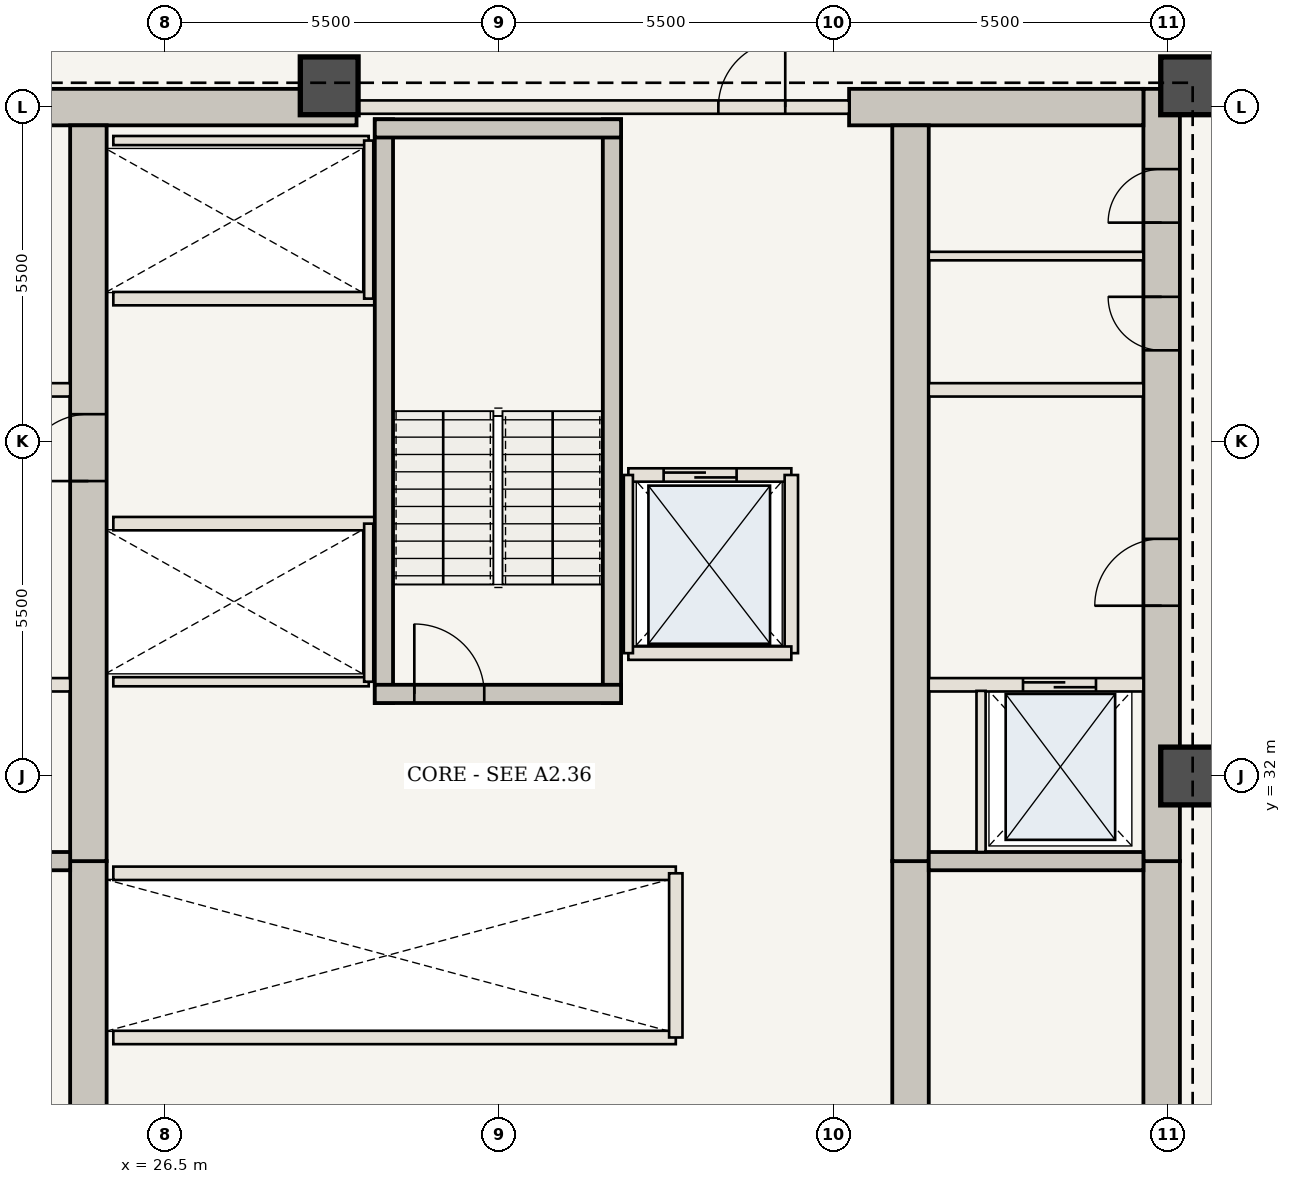
"""IFC4 building model, lengths in metres.
Left out: names, types, materials, properties, quantities, classifications, styles, units other than length and angle.
Written with IfcOpenShell. Run it as: python <this file> out.ifc"""

import sys

from ifc_helpers import new_model, si_unit, direction, frame, frame_2d, origin, origin_2d, place, context, subcontext, project, spatial, rectangle, extrude, element, fill, save


model = new_model("IFC4")
c1 = context("Model", 3, precision=1e-05, world=origin(), true_north=direction((0.0, 1.0)))
c2 = subcontext(c1, "Body", "Model", "MODEL_VIEW")
j1 = project(units=[si_unit("LENGTHUNIT", "METRE"), si_unit("PLANEANGLEUNIT", "RADIAN")], contexts=[c1])
p1 = place(None, origin())
s1 = spatial("IfcSite", under=j1, at=p1, CompositionType="ELEMENT")
p2 = place(p1, origin())
s2 = spatial("IfcBuilding", under=s1, at=p2, CompositionType="ELEMENT")
p3 = place(p2, frame((0.0, 0.0, 156.8)))
s3 = spatial("IfcBuildingStorey", under=s2, at=p3, CompositionType="ELEMENT", Elevation=156.8)
p4 = place(p3, frame((42.89, 20.65, 0.0), z_axis=(0.0, 0.0, 1.0), x_axis=(0.0, 1.0, 0.0)))
e1 = element("IfcWall", 1, at=p4, inside=s3, PredefinedType="SHEAR", context=c2, shape_type="SweptSolid", body=[
    extrude(rectangle(XDim=9.95, YDim=0.6, at=frame_2d((4.975, 0.0))), origin(), (0.0, 0.0, 1.0), 3.85),
])
p5 = place(p4, frame((1.1, 0.0, 0.0)))
e2 = element("IfcOpeningElement", 2, at=p5, cuts=e1, PredefinedType="OPENING", context=c2, shape_type="SweptSolid", body=[
    extrude(rectangle(XDim=1.15, YDim=2.15, at=frame_2d((0.575, 1.075))), frame((0.0, 0.31, 0.0), z_axis=(0.0, -1.0, 0.0), x_axis=(1.0, 0.0, 0.0)), (0.0, 0.0, 1.0), 0.62),
])
p6 = place(p3, frame((42.89, 30.6, 0.0), z_axis=(0.0, 0.0, 1.0), x_axis=(0.0, 1.0, 0.0)))
e3 = element("IfcWall", 3, at=p6, inside=s3, PredefinedType="SHEAR", context=c2, shape_type="SweptSolid", body=[
    extrude(rectangle(XDim=12.7, YDim=0.6, at=frame_2d((6.35, 0.0))), origin(), (0.0, 0.0, 1.0), 3.85),
])
p7 = place(p6, frame((4.2, 0.0, 0.0)))
e4 = element("IfcOpeningElement", 4, at=p7, cuts=e3, PredefinedType="OPENING", context=c2, shape_type="SweptSolid", body=[
    extrude(rectangle(XDim=1.1, YDim=2.15, at=frame_2d((0.55, 1.075))), frame((0.0, 0.31, 0.0), z_axis=(0.0, -1.0, 0.0), x_axis=(1.0, 0.0, 0.0)), (0.0, 0.0, 1.0), 0.62),
])
p8 = place(p6, frame((8.4, 0.0, 0.0)))
e5 = element("IfcOpeningElement", 5, at=p8, cuts=e3, PredefinedType="OPENING", context=c2, shape_type="SweptSolid", body=[
    extrude(rectangle(XDim=0.88, YDim=2.1, at=frame_2d((0.44, 1.05))), frame((0.0, 0.31, 0.0), z_axis=(0.0, -1.0, 0.0), x_axis=(1.0, 0.0, 0.0)), (0.0, 0.0, 1.0), 0.62),
])
p9 = place(p6, frame((10.5, 0.0, 0.0)))
e6 = element("IfcOpeningElement", 6, at=p9, cuts=e3, PredefinedType="OPENING", context=c2, shape_type="SweptSolid", body=[
    extrude(rectangle(XDim=0.88, YDim=2.1, at=frame_2d((0.44, 1.05))), frame((0.0, 0.31, 0.0), z_axis=(0.0, -1.0, 0.0), x_axis=(1.0, 0.0, 0.0)), (0.0, 0.0, 1.0), 0.62),
])
p10 = place(p3, frame((21.41, 43.0, 0.0), z_axis=(0.0, 0.0, 1.0), x_axis=(1.0, 0.0, 0.0)))
e7 = element("IfcWall", 7, at=p10, inside=s3, PredefinedType="SHEAR", context=c2, shape_type="SweptSolid", body=[
    extrude(rectangle(XDim=8.24, YDim=0.6, at=frame_2d((4.12, 0.0))), origin(), (0.0, 0.0, 1.0), 3.85),
])
p11 = place(p3, frame((37.75, 43.0, 0.0), z_axis=(0.0, 0.0, 1.0), x_axis=(1.0, 0.0, 0.0)))
e8 = element("IfcWall", 8, at=p11, inside=s3, PredefinedType="SHEAR", context=c2, shape_type="SweptSolid", body=[
    extrude(rectangle(XDim=4.84, YDim=0.6, at=frame_2d((2.42, 0.0))), origin(), (0.0, 0.0, 1.0), 3.85),
])
p12 = place(p3, frame((25.24, 21.25, 0.0), z_axis=(0.0, 0.0, 1.0), x_axis=(0.0, 1.0, 0.0)))
e9 = element("IfcWall", 9, at=p12, inside=s3, PredefinedType="SHEAR", context=c2, shape_type="SweptSolid", body=[
    extrude(rectangle(XDim=9.35, YDim=0.6, at=frame_2d((4.675, 0.0))), origin(), (0.0, 0.0, 1.0), 3.85),
])
p13 = place(p3, frame((25.24, 30.6, 0.0), z_axis=(0.0, 0.0, 1.0), x_axis=(0.0, 1.0, 0.0)))
e10 = element("IfcWall", 10, at=p13, inside=s3, PredefinedType="SHEAR", context=c2, shape_type="SweptSolid", body=[
    extrude(rectangle(XDim=12.1, YDim=0.6, at=frame_2d((6.05, 0.0))), origin(), (0.0, 0.0, 1.0), 3.85),
])
p14 = place(p13, frame((6.25, 0.0, 0.0)))
e11 = element("IfcOpeningElement", 11, at=p14, cuts=e10, PredefinedType="OPENING", context=c2, shape_type="SweptSolid", body=[
    extrude(rectangle(XDim=1.1, YDim=2.15, at=frame_2d((0.55, 1.075))), frame((0.0, 0.31, 0.0), z_axis=(0.0, -1.0, 0.0), x_axis=(1.0, 0.0, 0.0)), (0.0, 0.0, 1.0), 0.62),
])
p15 = place(p3, frame((38.76, 21.25, 0.0), z_axis=(0.0, 0.0, 1.0), x_axis=(0.0, 1.0, 0.0)))
e12 = element("IfcWall", 12, at=p15, inside=s3, PredefinedType="SHEAR", context=c2, shape_type="SweptSolid", body=[
    extrude(rectangle(XDim=9.35, YDim=0.6, at=frame_2d((4.675, 0.0))), origin(), (0.0, 0.0, 1.0), 3.85),
])
p16 = place(p3, frame((38.76, 30.6, 0.0), z_axis=(0.0, 0.0, 1.0), x_axis=(0.0, 1.0, 0.0)))
e13 = element("IfcWall", 13, at=p16, inside=s3, PredefinedType="SHEAR", context=c2, shape_type="SweptSolid", body=[
    extrude(rectangle(XDim=12.1, YDim=0.6, at=frame_2d((6.05, 0.0))), origin(), (0.0, 0.0, 1.0), 3.85),
])
for number, where, z_axis, x_axis in (
    (14, (43.35, 32.0, 0.0), (0.0, 0.0, 1.0), (1.0, 0.0, 0.0)),
    (15, (43.35, 43.35, 0.0), (0.0, 0.0, 1.0), (1.0, 0.0, 0.0)),
    (16, (29.2, 43.35, 0.0), (0.0, 0.0, 1.0), (1.0, 0.0, 0.0)),
):
    element("IfcColumn", number, at=place(p3, frame(where, z_axis=z_axis, x_axis=x_axis)), inside=s3, PredefinedType="COLUMN", context=c2, shape_type="SweptSolid", body=[
        extrude(rectangle(XDim=0.95, YDim=0.95, at=origin_2d()), origin(), (0.0, 0.0, 1.0), 3.85),
    ])
for number, where, z_axis, x_axis in (
    (17, (21.41, 30.6, 0.0), (0.0, 0.0, 1.0), (1.0, 0.0, 0.0)),
    (18, (39.06, 30.6, 0.0), (0.0, 0.0, 1.0), (1.0, 0.0, 0.0)),
):
    element("IfcWall", number, at=place(p3, frame(where, z_axis=z_axis, x_axis=x_axis)), inside=s3, PredefinedType="SHEAR", context=c2, shape_type="SweptSolid", body=[
        extrude(rectangle(XDim=3.53, YDim=0.3, at=frame_2d((1.765, 0.0))), origin(), (0.0, 0.0, 1.0), 3.685),
    ])
p17 = place(p3, frame((21.41, 33.5, 0.0), z_axis=(0.0, 0.0, 1.0), x_axis=(1.0, 0.0, 0.0)))
e19 = element("IfcWall", 19, at=p17, inside=s3, PredefinedType="STANDARD", context=c2, shape_type="SweptSolid", body=[
    extrude(rectangle(XDim=3.53, YDim=0.22, at=frame_2d((1.765, 0.0))), origin(), (0.0, 0.0, 1.0), 3.685),
])
p18 = place(p17, frame((0.75, 0.0, 0.0)))
e20 = element("IfcOpeningElement", 20, at=p18, cuts=e19, PredefinedType="OPENING", context=c2, shape_type="SweptSolid", body=[
    extrude(rectangle(XDim=1.2, YDim=2.2, at=frame_2d((0.6, 1.1))), frame((0.0, 0.12, 0.0), z_axis=(0.0, -1.0, 0.0), x_axis=(1.0, 0.0, 0.0)), (0.0, 0.0, 1.0), 0.24),
])
p19 = place(p3, frame((39.06, 33.5, 0.0), z_axis=(0.0, 0.0, 1.0), x_axis=(1.0, 0.0, 0.0)))
e21 = element("IfcWall", 21, at=p19, inside=s3, PredefinedType="STANDARD", context=c2, shape_type="SweptSolid", body=[
    extrude(rectangle(XDim=3.53, YDim=0.22, at=frame_2d((1.765, 0.0))), origin(), (0.0, 0.0, 1.0), 3.685),
])
p20 = place(p19, frame((1.55, 0.0, 0.0)))
e22 = element("IfcOpeningElement", 22, at=p20, cuts=e21, PredefinedType="OPENING", context=c2, shape_type="SweptSolid", body=[
    extrude(rectangle(XDim=1.2, YDim=2.2, at=frame_2d((0.6, 1.1))), frame((0.0, 0.12, 0.0), z_axis=(0.0, -1.0, 0.0), x_axis=(1.0, 0.0, 0.0)), (0.0, 0.0, 1.0), 0.24),
])
p21 = place(p3, frame((39.92, 30.75, 0.0), z_axis=(0.0, 0.0, 1.0), x_axis=(0.0, 1.0, 0.0)))
e23 = element("IfcWall", 23, at=p21, inside=s3, PredefinedType="STANDARD", context=c2, shape_type="SweptSolid", body=[
    extrude(rectangle(XDim=2.65, YDim=0.15, at=frame_2d((1.325, 0.0))), origin(), (0.0, 0.0, 1.0), 3.685),
])
for number, where, z_axis, x_axis in (
    (24, (21.41, 38.35, 0.0), (0.0, 0.0, 1.0), (1.0, 0.0, 0.0)),
    (25, (39.06, 38.35, 0.0), (0.0, 0.0, 1.0), (1.0, 0.0, 0.0)),
):
    element("IfcWall", number, at=place(p3, frame(where, z_axis=z_axis, x_axis=x_axis)), inside=s3, PredefinedType="STANDARD", context=c2, shape_type="SweptSolid", body=[
        extrude(rectangle(XDim=3.53, YDim=0.22, at=frame_2d((1.765, 0.0))), origin(), (0.0, 0.0, 1.0), 3.685),
    ])
p22 = place(p3, frame((39.06, 40.55, 0.0), z_axis=(0.0, 0.0, 1.0), x_axis=(1.0, 0.0, 0.0)))
e26 = element("IfcWall", 26, at=p22, inside=s3, PredefinedType="STANDARD", context=c2, shape_type="SweptSolid", body=[
    extrude(rectangle(XDim=3.53, YDim=0.14, at=frame_2d((1.765, 0.0))), origin(), (0.0, 0.0, 1.0), 3.685),
])
for number, where, z_axis, x_axis in (
    (27, (25.65, 27.7, 0.0), (0.0, 0.0, 1.0), (1.0, 0.0, 0.0)),
    (28, (25.65, 30.4, 0.0), (0.0, 0.0, 1.0), (1.0, 0.0, 0.0)),
):
    element("IfcWall", number, at=place(p3, frame(where, z_axis=z_axis, x_axis=x_axis)), inside=s3, PredefinedType="STANDARD", context=c2, shape_type="SweptSolid", body=[
        extrude(rectangle(XDim=9.25, YDim=0.22, at=frame_2d((4.625, 0.0))), origin(), (0.0, 0.0, 1.0), 3.685),
    ])
p23 = place(p3, frame((34.9, 27.7, 0.0), z_axis=(0.0, 0.0, 1.0), x_axis=(0.0, 1.0, 0.0)))
e29 = element("IfcWall", 29, at=p23, inside=s3, PredefinedType="STANDARD", context=c2, shape_type="SweptSolid", body=[
    extrude(rectangle(XDim=2.7, YDim=0.22, at=frame_2d((1.35, 0.0))), origin(), (0.0, 0.0, 1.0), 3.685),
])
p24 = place(p3, frame((25.65, 36.15, 0.0), z_axis=(0.0, 0.0, 1.0), x_axis=(1.0, 0.0, 0.0)))
e30 = element("IfcWall", 30, at=p24, inside=s3, PredefinedType="STANDARD", context=c2, shape_type="SweptSolid", body=[
    extrude(rectangle(XDim=4.3, YDim=0.22, at=frame_2d((2.15, 0.0))), origin(), (0.0, 0.0, 1.0), 3.685),
])
p25 = place(p3, frame((25.65, 33.55, 0.0), z_axis=(0.0, 0.0, 1.0), x_axis=(1.0, 0.0, 0.0)))
e31 = element("IfcWall", 31, at=p25, inside=s3, PredefinedType="STANDARD", context=c2, shape_type="SweptSolid", body=[
    extrude(rectangle(XDim=4.2, YDim=0.15, at=frame_2d((2.1, 0.0))), origin(), (0.0, 0.0, 1.0), 3.685),
])
p26 = place(p3, frame((29.85, 33.55, 0.0), z_axis=(0.0, 0.0, 1.0), x_axis=(0.0, 1.0, 0.0)))
e32 = element("IfcWall", 32, at=p26, inside=s3, PredefinedType="STANDARD", context=c2, shape_type="SweptSolid", body=[
    extrude(rectangle(XDim=2.6, YDim=0.15, at=frame_2d((1.3, 0.0))), origin(), (0.0, 0.0, 1.0), 3.685),
])
p27 = place(p3, frame((25.65, 39.85, 0.0), z_axis=(0.0, 0.0, 1.0), x_axis=(1.0, 0.0, 0.0)))
e33 = element("IfcWall", 33, at=p27, inside=s3, PredefinedType="STANDARD", context=c2, shape_type="SweptSolid", body=[
    extrude(rectangle(XDim=4.3, YDim=0.22, at=frame_2d((2.15, 0.0))), origin(), (0.0, 0.0, 1.0), 3.685),
])
p28 = place(p3, frame((25.65, 42.45, 0.0), z_axis=(0.0, 0.0, 1.0), x_axis=(1.0, 0.0, 0.0)))
e34 = element("IfcWall", 34, at=p28, inside=s3, PredefinedType="STANDARD", context=c2, shape_type="SweptSolid", body=[
    extrude(rectangle(XDim=4.2, YDim=0.15, at=frame_2d((2.1, 0.0))), origin(), (0.0, 0.0, 1.0), 3.685),
])
p29 = place(p3, frame((29.85, 39.85, 0.0), z_axis=(0.0, 0.0, 1.0), x_axis=(0.0, 1.0, 0.0)))
e35 = element("IfcWall", 35, at=p29, inside=s3, PredefinedType="STANDARD", context=c2, shape_type="SweptSolid", body=[
    extrude(rectangle(XDim=2.6, YDim=0.15, at=frame_2d((1.3, 0.0))), origin(), (0.0, 0.0, 1.0), 3.685),
])
for number, where, z_axis, x_axis in (
    (36, (30.1, 33.2, 0.0), (0.0, 0.0, 1.0), (0.0, 1.0, 0.0)),
    (37, (33.85, 33.2, 0.0), (0.0, 0.0, 1.0), (0.0, 1.0, 0.0)),
):
    element("IfcWall", number, at=place(p3, frame(where, z_axis=z_axis, x_axis=x_axis)), inside=s3, PredefinedType="SHEAR", context=c2, shape_type="SweptSolid", body=[
        extrude(rectangle(XDim=9.6, YDim=0.3, at=frame_2d((4.8, 0.0))), origin(), (0.0, 0.0, 1.0), 3.685),
    ])
p30 = place(p3, frame((29.95, 33.35, 0.0), z_axis=(0.0, 0.0, 1.0), x_axis=(1.0, 0.0, 0.0)))
e38 = element("IfcWall", 38, at=p30, inside=s3, PredefinedType="SHEAR", context=c2, shape_type="SweptSolid", body=[
    extrude(rectangle(XDim=4.05, YDim=0.3, at=frame_2d((2.025, 0.0))), origin(), (0.0, 0.0, 1.0), 3.685),
])
p31 = place(p30, frame((0.65, 0.0, 0.0)))
e39 = element("IfcOpeningElement", 39, at=p31, cuts=e38, PredefinedType="OPENING", context=c2, shape_type="SweptSolid", body=[
    extrude(rectangle(XDim=1.15, YDim=2.15, at=frame_2d((0.575, 1.075))), frame((0.0, 0.16, 0.0), z_axis=(0.0, -1.0, 0.0), x_axis=(1.0, 0.0, 0.0)), (0.0, 0.0, 1.0), 0.32),
])
p32 = place(p3, frame((29.95, 42.65, 0.0), z_axis=(0.0, 0.0, 1.0), x_axis=(1.0, 0.0, 0.0)))
e40 = element("IfcWall", 40, at=p32, inside=s3, PredefinedType="SHEAR", context=c2, shape_type="SweptSolid", body=[
    extrude(rectangle(XDim=4.05, YDim=0.3, at=frame_2d((2.025, 0.0))), origin(), (0.0, 0.0, 1.0), 3.685),
])
p33 = place(p3, frame((29.65, 43.0, 0.0), z_axis=(0.0, 0.0, 1.0), x_axis=(1.0, 0.0, 0.0)))
e41 = element("IfcWall", 41, at=p33, inside=s3, PredefinedType="STANDARD", context=c2, shape_type="SweptSolid", body=[
    extrude(rectangle(XDim=8.1, YDim=0.22, at=frame_2d((4.05, 0.0))), origin(), (0.0, 0.0, 1.0), 3.685),
])
p34 = place(p33, frame((5.95, 0.0, 0.0)))
e42 = element("IfcOpeningElement", 42, at=p34, cuts=e41, PredefinedType="OPENING", context=c2, shape_type="SweptSolid", body=[
    extrude(rectangle(XDim=1.1, YDim=2.15, at=frame_2d((0.55, 1.075))), frame((0.0, 0.12, 0.0), z_axis=(0.0, -1.0, 0.0), x_axis=(1.0, 0.0, 0.0)), (0.0, 0.0, 1.0), 0.24),
])
p35 = place(p3, frame((34.12, 36.95, 0.0), z_axis=(0.0, 0.0, 1.0), x_axis=(1.0, 0.0, 0.0)))
e43 = element("IfcWall", 43, at=p35, inside=s3, PredefinedType="STANDARD", context=c2, shape_type="SweptSolid", body=[
    extrude(rectangle(XDim=2.68, YDim=0.22, at=frame_2d((1.34, 0.0))), origin(), (0.0, 0.0, 1.0), 3.685),
])
p36 = place(p35, frame((0.58, 0.0, 0.0)))
e44 = element("IfcOpeningElement", 44, at=p36, cuts=e43, PredefinedType="OPENING", context=c2, shape_type="SweptSolid", body=[
    extrude(rectangle(XDim=1.2, YDim=2.2, at=frame_2d((0.6, 1.1))), frame((0.0, 0.12, 0.0), z_axis=(0.0, -1.0, 0.0), x_axis=(1.0, 0.0, 0.0)), (0.0, 0.0, 1.0), 0.24),
])
p37 = place(p3, frame((36.8, 34.02, 0.0), z_axis=(0.0, 0.0, 1.0), x_axis=(0.0, 1.0, 0.0)))
e45 = element("IfcWall", 45, at=p37, inside=s3, PredefinedType="STANDARD", context=c2, shape_type="SweptSolid", body=[
    extrude(rectangle(XDim=2.93, YDim=0.22, at=frame_2d((1.465, 0.0))), origin(), (0.0, 0.0, 1.0), 3.685),
])
p38 = place(p3, frame((34.12, 34.02, 0.0), z_axis=(0.0, 0.0, 1.0), x_axis=(1.0, 0.0, 0.0)))
e46 = element("IfcWall", 46, at=p38, inside=s3, PredefinedType="STANDARD", context=c2, shape_type="SweptSolid", body=[
    extrude(rectangle(XDim=2.68, YDim=0.22, at=frame_2d((1.34, 0.0))), origin(), (0.0, 0.0, 1.0), 3.685),
])
p39 = place(p3, frame((34.12, 34.02, 0.0), z_axis=(0.0, 0.0, 1.0), x_axis=(0.0, 1.0, 0.0)))
e47 = element("IfcWall", 47, at=p39, inside=s3, PredefinedType="STANDARD", context=c2, shape_type="SweptSolid", body=[
    extrude(rectangle(XDim=2.93, YDim=0.15, at=frame_2d((1.465, 0.0))), origin(), (0.0, 0.0, 1.0), 3.685),
])
p40 = place(p7, origin())
e48 = element("IfcDoor", 48, at=p40, inside=s3, OperationType="SINGLE_SWING_LEFT", PredefinedType="DOOR", context=c2, shape_type="SweptSolid", body=[
    extrude(rectangle(XDim=1.1, YDim=2.15, at=frame_2d((0.55, 1.075))), frame((0.0, 0.025, 0.0), z_axis=(0.0, -1.0, 0.0), x_axis=(1.0, 0.0, 0.0)), (0.0, 0.0, 1.0), 0.05),
])
fill(e4, e48)
p41 = place(p14, origin())
e49 = element("IfcDoor", 49, at=p41, inside=s3, OperationType="SINGLE_SWING_LEFT", PredefinedType="DOOR", context=c2, shape_type="SweptSolid", body=[
    extrude(rectangle(XDim=1.1, YDim=2.15, at=frame_2d((0.55, 1.075))), frame((0.0, 0.025, 0.0), z_axis=(0.0, -1.0, 0.0), x_axis=(1.0, 0.0, 0.0)), (0.0, 0.0, 1.0), 0.05),
])
fill(e11, e49)
p42 = place(p8, origin())
e50 = element("IfcDoor", 50, at=p42, inside=s3, OperationType="SINGLE_SWING_RIGHT", PredefinedType="DOOR", context=c2, shape_type="SweptSolid", body=[
    extrude(rectangle(XDim=0.88, YDim=2.1, at=frame_2d((0.44, 1.05))), frame((0.0, 0.025, 0.0), z_axis=(0.0, -1.0, 0.0), x_axis=(1.0, 0.0, 0.0)), (0.0, 0.0, 1.0), 0.05),
])
fill(e5, e50)
p43 = place(p9, origin())
e51 = element("IfcDoor", 51, at=p43, inside=s3, OperationType="SINGLE_SWING_LEFT", PredefinedType="DOOR", context=c2, shape_type="SweptSolid", body=[
    extrude(rectangle(XDim=0.88, YDim=2.1, at=frame_2d((0.44, 1.05))), frame((0.0, 0.025, 0.0), z_axis=(0.0, -1.0, 0.0), x_axis=(1.0, 0.0, 0.0)), (0.0, 0.0, 1.0), 0.05),
])
fill(e6, e51)
p44 = place(p20, origin())
e52 = element("IfcDoor", 52, at=p44, inside=s3, OperationType="DOUBLE_DOOR_SLIDING", PredefinedType="DOOR", context=c2, shape_type="SweptSolid", body=[
    extrude(rectangle(XDim=1.2, YDim=2.2, at=frame_2d((0.6, 1.1))), frame((0.0, 0.025, 0.0), z_axis=(0.0, -1.0, 0.0), x_axis=(1.0, 0.0, 0.0)), (0.0, 0.0, 1.0), 0.05),
])
fill(e22, e52)
p45 = place(p31, origin())
e53 = element("IfcDoor", 53, at=p45, inside=s3, OperationType="SINGLE_SWING_LEFT", PredefinedType="DOOR", context=c2, shape_type="SweptSolid", body=[
    extrude(rectangle(XDim=1.15, YDim=2.15, at=frame_2d((0.575, 1.075))), frame((0.0, 0.025, 0.0), z_axis=(0.0, -1.0, 0.0), x_axis=(1.0, 0.0, 0.0)), (0.0, 0.0, 1.0), 0.05),
])
fill(e39, e53)
p46 = place(p34, origin())
e54 = element("IfcDoor", 54, at=p46, inside=s3, OperationType="SINGLE_SWING_RIGHT", PredefinedType="DOOR", context=c2, shape_type="SweptSolid", body=[
    extrude(rectangle(XDim=1.1, YDim=2.15, at=frame_2d((0.55, 1.075))), frame((0.0, 0.025, 0.0), z_axis=(0.0, -1.0, 0.0), x_axis=(1.0, 0.0, 0.0)), (0.0, 0.0, 1.0), 0.05),
])
fill(e42, e54)
p47 = place(p36, origin())
e55 = element("IfcDoor", 55, at=p47, inside=s3, OperationType="DOUBLE_DOOR_SLIDING", PredefinedType="DOOR", context=c2, shape_type="SweptSolid", body=[
    extrude(rectangle(XDim=1.2, YDim=2.2, at=frame_2d((0.6, 1.1))), frame((0.0, 0.025, 0.0), z_axis=(0.0, -1.0, 0.0), x_axis=(1.0, 0.0, 0.0)), (0.0, 0.0, 1.0), 0.05),
])
fill(e44, e55)
save(model, sys.argv[1])
